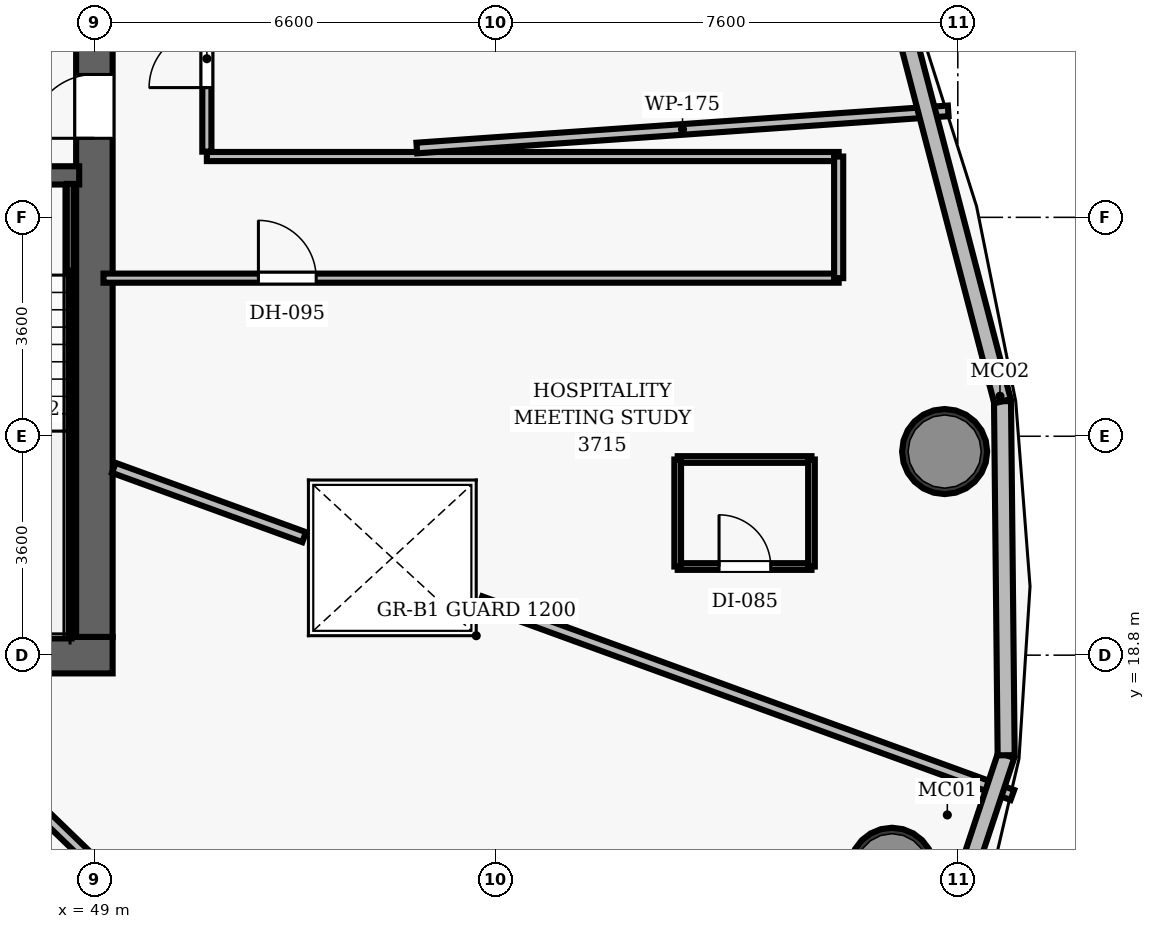
"""IFC4 building model, lengths in metres.
Left out: names, types, materials, properties, quantities, classifications, styles, units other than length and angle.
Written with IfcOpenShell. Run it as: python <this file> out.ifc"""

import sys

from ifc_helpers import new_model, si_unit, direction, frame, frame_2d, origin, origin_2d, place, context, subcontext, project, spatial, rectangle, hollow_circle, extrude, element, fill, save


model = new_model("IFC4")
c1 = context("Model", 3, precision=1e-05, world=origin(), true_north=direction((0.0, 1.0)))
c2 = subcontext(c1, "Body", "Model", "MODEL_VIEW")
j1 = project(units=[si_unit("LENGTHUNIT", "METRE"), si_unit("PLANEANGLEUNIT", "RADIAN")], contexts=[c1])
p1 = place(None, origin())
s1 = spatial("IfcSite", under=j1, at=p1, CompositionType="ELEMENT")
p2 = place(p1, origin())
s2 = spatial("IfcBuilding", under=s1, at=p2, CompositionType="ELEMENT")
p3 = place(p2, frame((0.0, 0.0, 148.3)))
s3 = spatial("IfcBuildingStorey", under=s2, at=p3, CompositionType="ELEMENT", Elevation=148.3)
p4 = place(p3, frame((26.7, 18.8, 0.0), z_axis=(0.0, 0.0, 1.0), x_axis=(1.0, 0.0, 0.0)))
e1 = element("IfcWall", 1, at=p4, inside=s3, PredefinedType="SHEAR", context=c2, shape_type="SweptSolid", body=[
    extrude(rectangle(XDim=22.6, YDim=0.6, at=frame_2d((11.3, 0.0))), origin(), (0.0, 0.0, 1.0), 3.5),
])
p5 = place(p4, frame((14.52, 0.0, 0.0)))
e2 = element("IfcOpeningElement", 2, at=p5, cuts=e1, PredefinedType="OPENING", context=c2, shape_type="SweptSolid", body=[
    extrude(rectangle(XDim=1.05, YDim=2.15, at=frame_2d((0.525, 1.075))), frame((0.0, 0.31, 0.0), z_axis=(0.0, -1.0, 0.0), x_axis=(1.0, 0.0, 0.0)), (0.0, 0.0, 1.0), 0.62),
])
p6 = place(p3, frame((49.0, 19.1, 0.0), z_axis=(0.0, 0.0, 1.0), x_axis=(0.0, 1.0, 0.0)))
e3 = element("IfcWall", 3, at=p6, inside=s3, PredefinedType="SHEAR", context=c2, shape_type="SweptSolid", body=[
    extrude(rectangle(XDim=13.8, YDim=0.6, at=frame_2d((6.9, 0.0))), origin(), (0.0, 0.0, 1.0), 3.5),
])
p7 = place(p6, frame((8.2, 0.0, 0.0)))
e4 = element("IfcOpeningElement", 4, at=p7, cuts=e3, PredefinedType="OPENING", context=c2, shape_type="SweptSolid", body=[
    extrude(rectangle(XDim=1.05, YDim=2.15, at=frame_2d((0.525, 1.075))), frame((0.0, 0.31, 0.0), z_axis=(0.0, -1.0, 0.0), x_axis=(1.0, 0.0, 0.0)), (0.0, 0.0, 1.0), 0.62),
])
for number, where, z_axis, x_axis in (
    (5, (62.118, 15.262, 0.0), (0.0, 0.0, 1.0), (1.0, 0.0, 0.0)),
    (6, (62.984, 22.148, 0.0), (0.0, 0.0, 1.0), (1.0, 0.0, 0.0)),
):
    element("IfcColumn", number, at=place(p3, frame(where, z_axis=z_axis, x_axis=x_axis)), inside=s3, PredefinedType="COLUMN", context=c2, shape_type="SweptSolid", body=[
        extrude(hollow_circle(Radius=0.7, WallThickness=0.055, at=origin_2d()), origin(), (0.0, 0.0, 1.0), 3.5),
    ])
p8 = place(p3, frame((45.08, 26.69, 0.0), z_axis=(0.0, 0.0, 1.0), x_axis=(1.0, 0.0, 0.0)))
e7 = element("IfcWall", 7, at=p8, inside=s3, PredefinedType="SHEAR", context=c2, shape_type="SweptSolid", body=[
    extrude(rectangle(XDim=3.67, YDim=0.3, at=frame_2d((1.835, 0.0))), origin(), (0.0, 0.0, 1.0), 3.5),
])
p9 = place(p8, frame((1.05, 0.0, 0.0)))
e8 = element("IfcOpeningElement", 8, at=p9, cuts=e7, PredefinedType="OPENING", context=c2, shape_type="SweptSolid", body=[
    extrude(rectangle(XDim=1.1, YDim=2.15, at=frame_2d((0.55, 1.075))), frame((0.0, 0.16, 0.0), z_axis=(0.0, -1.0, 0.0), x_axis=(1.0, 0.0, 0.0)), (0.0, 0.0, 1.0), 0.32),
])
p10 = place(p3, frame((48.605, 19.1, 0.0), z_axis=(0.0, 0.0, 1.0), x_axis=(0.0, 1.0, 0.0)))
e9 = element("IfcWall", 9, at=p10, inside=s3, PredefinedType="SHEAR", context=c2, shape_type="SweptSolid", body=[
    extrude(rectangle(XDim=7.45, YDim=0.12, at=frame_2d((3.725, 0.0))), origin(), (0.0, 0.0, 1.0), 3.5),
])
p11 = place(p3, frame((45.51, 19.16, 0.0), z_axis=(0.0, 0.0, 1.0), x_axis=(1.0, 0.0, 0.0)))
e10 = element("IfcWall", 10, at=p11, inside=s3, PredefinedType="SHEAR", context=c2, shape_type="SweptSolid", body=[
    extrude(rectangle(XDim=3.095, YDim=0.12, at=frame_2d((1.547, 0.0))), origin(), (0.0, 0.0, 1.0), 3.5),
])
p12 = place(p3, frame((50.85, 27.08, 0.0), z_axis=(0.0, 0.0, 1.0), x_axis=(0.0, 1.0, 0.0)))
e11 = element("IfcWall", 11, at=p12, inside=s3, PredefinedType="PARTITIONING", context=c2, shape_type="SweptSolid", body=[
    extrude(rectangle(XDim=8.12, YDim=0.15, at=frame_2d((4.06, 0.0))), origin(), (0.0, 0.0, 1.0), 2.675),
])
p13 = place(p12, frame((1.054, 0.0, 0.0)))
e12 = element("IfcOpeningElement", 12, at=p13, cuts=e11, PredefinedType="OPENING", context=c2, shape_type="SweptSolid", body=[
    extrude(rectangle(XDim=0.95, YDim=2.15, at=frame_2d((0.475, 1.075))), frame((0.0, 0.085, 0.0), z_axis=(0.0, -1.0, 0.0), x_axis=(1.0, 0.0, 0.0)), (0.0, 0.0, 1.0), 0.17),
])
p14 = place(p3, frame((50.85, 27.0, 0.0), z_axis=(0.0, 0.0, 1.0), x_axis=(1.0, 0.0, 0.0)))
e13 = element("IfcWall", 13, at=p14, inside=s3, PredefinedType="PARTITIONING", context=c2, shape_type="SweptSolid", body=[
    extrude(rectangle(XDim=10.391, YDim=0.15, at=frame_2d((5.195, 0.0))), origin(), (0.0, 0.0, 1.0), 2.675),
])
p15 = place(p3, frame((49.15, 25.0, 0.0), z_axis=(0.0, 0.0, 1.0), x_axis=(1.0, 0.0, 0.0)))
e14 = element("IfcWall", 14, at=p15, inside=s3, PredefinedType="PARTITIONING", context=c2, shape_type="SweptSolid", body=[
    extrude(rectangle(XDim=12.091, YDim=0.15, at=frame_2d((6.045, 0.0))), origin(), (0.0, 0.0, 1.0), 2.675),
])
p16 = place(p15, frame((2.548, 0.0, 0.0)))
e15 = element("IfcOpeningElement", 15, at=p16, cuts=e14, PredefinedType="OPENING", context=c2, shape_type="SweptSolid", body=[
    extrude(rectangle(XDim=0.95, YDim=2.15, at=frame_2d((0.475, 1.075))), frame((0.0, 0.085, 0.0), z_axis=(0.0, -1.0, 0.0), x_axis=(1.0, 0.0, 0.0)), (0.0, 0.0, 1.0), 0.17),
])
p17 = place(p3, frame((61.241, 25.0, 0.0), z_axis=(0.0, 0.0, 1.0), x_axis=(0.0, 1.0, 0.0)))
e16 = element("IfcWall", 16, at=p17, inside=s3, PredefinedType="PARTITIONING", context=c2, shape_type="SweptSolid", body=[
    extrude(rectangle(XDim=2.0, YDim=0.15, at=frame_2d((1.0, 0.0))), origin(), (0.0, 0.0, 1.0), 2.675),
])
p18 = place(p3, frame((54.303, 27.14, 0.0), z_axis=(0.0, 0.0, 1.0), x_axis=(0.997562576326, 0.069777548777, 0.0)))
e17 = element("IfcWall", 17, at=p18, inside=s3, PredefinedType="PARTITIONING", context=c2, shape_type="SweptSolid", body=[
    extrude(rectangle(XDim=8.761, YDim=0.175, at=frame_2d((4.38, 0.0))), origin(), (0.0, 0.0, 1.0), 2.675),
])
p19 = place(p3, frame((45.787, 18.48, 0.0), z_axis=(0.0, 0.0, 1.0), x_axis=(0.719347752113, -0.694650136062, 0.0)))
e18 = element("IfcWall", 18, at=p19, inside=s3, PredefinedType="PARTITIONING", context=c2, shape_type="SweptSolid", body=[
    extrude(rectangle(XDim=16.449, YDim=0.175, at=frame_2d((8.225, 0.0))), origin(), (0.0, 0.0, 1.0), 2.675),
])
p20 = place(p3, frame((49.32, 21.88, 0.0), z_axis=(0.0, 0.0, 1.0), x_axis=(0.939671379792, -0.34207849684, 0.0)))
e19 = element("IfcWall", 19, at=p20, inside=s3, PredefinedType="PARTITIONING", context=c2, shape_type="SweptSolid", body=[
    extrude(rectangle(XDim=3.331, YDim=0.175, at=frame_2d((1.666, 0.0))), origin(), (0.0, 0.0, 1.0), 2.675),
])
p21 = place(p3, frame((55.35, 19.685, 0.0), z_axis=(0.0, 0.0, 1.0), x_axis=(0.939690778586, -0.342025204686, 0.0)))
e20 = element("IfcWall", 20, at=p21, inside=s3, PredefinedType="PARTITIONING", context=c2, shape_type="SweptSolid", body=[
    extrude(rectangle(XDim=9.31, YDim=0.175, at=frame_2d((4.655, 0.0))), origin(), (0.0, 0.0, 1.0), 2.675),
])
p22 = place(p3, frame((58.594, 20.258, 0.0), z_axis=(0.0, 0.0, 1.0), x_axis=(1.0, 0.0, 0.0)))
e21 = element("IfcWall", 21, at=p22, inside=s3, PredefinedType="PARTITIONING", context=c2, shape_type="SweptSolid", body=[
    extrude(rectangle(XDim=2.2, YDim=0.11, at=frame_2d((1.1, 0.0))), origin(), (0.0, 0.0, 1.0), 2.675),
])
p23 = place(p22, frame((0.68, 0.0, 0.0)))
e22 = element("IfcOpeningElement", 22, at=p23, cuts=e21, PredefinedType="OPENING", context=c2, shape_type="SweptSolid", body=[
    extrude(rectangle(XDim=0.85, YDim=2.1, at=frame_2d((0.425, 1.05))), frame((0.0, 0.065, 0.0), z_axis=(0.0, -1.0, 0.0), x_axis=(1.0, 0.0, 0.0)), (0.0, 0.0, 1.0), 0.13),
])
p24 = place(p3, frame((58.594, 22.018, 0.0), z_axis=(0.0, 0.0, 1.0), x_axis=(1.0, 0.0, 0.0)))
e23 = element("IfcWall", 23, at=p24, inside=s3, PredefinedType="PARTITIONING", context=c2, shape_type="SweptSolid", body=[
    extrude(rectangle(XDim=2.2, YDim=0.11, at=frame_2d((1.1, 0.0))), origin(), (0.0, 0.0, 1.0), 2.675),
])
for number, where, z_axis, x_axis in (
    (24, (58.594, 20.258, 0.0), (0.0, 0.0, 1.0), (0.0, 1.0, 0.0)),
    (25, (60.793, 20.258, 0.0), (0.0, 0.0, 1.0), (0.0, 1.0, 0.0)),
):
    element("IfcWall", number, at=place(p3, frame(where, z_axis=z_axis, x_axis=x_axis)), inside=s3, PredefinedType="PARTITIONING", context=c2, shape_type="SweptSolid", body=[
        extrude(rectangle(XDim=1.76, YDim=0.11, at=frame_2d((0.88, 0.0))), origin(), (0.0, 0.0, 1.0), 2.675),
    ])
p25 = place(p3, frame((63.995, 17.154, 0.0), z_axis=(0.0, 0.0, 1.0), x_axis=(-0.315180118381, -0.949031871423, 0.0)))
e26 = element("IfcWall", 26, at=p25, inside=s3, PredefinedType="SOLIDWALL", context=c2, shape_type="SweptSolid", body=[
    extrude(rectangle(XDim=5.174, YDim=0.28, at=frame_2d((2.587, 0.0))), origin(), (0.0, 0.0, 1.0), 3.26),
])
p26 = place(p3, frame((63.935, 22.976, 0.0), z_axis=(0.0, 0.0, 1.0), x_axis=(0.010314349205, -0.999946805685, 0.0)))
e27 = element("IfcWall", 27, at=p26, inside=s3, PredefinedType="SOLIDWALL", context=c2, shape_type="SweptSolid", body=[
    extrude(rectangle(XDim=5.823, YDim=0.28, at=frame_2d((2.911, 0.0))), origin(), (0.0, 0.0, 1.0), 3.26),
])
p27 = place(p3, frame((62.251, 29.425, 0.0), z_axis=(0.0, 0.0, 1.0), x_axis=(0.252709673809, -0.967542154515, 0.0)))
e28 = element("IfcWall", 28, at=p27, inside=s3, PredefinedType="SOLIDWALL", context=c2, shape_type="SweptSolid", body=[
    extrude(rectangle(XDim=6.665, YDim=0.28, at=frame_2d((3.333, 0.0))), origin(), (0.0, 0.0, 1.0), 3.26),
])
p28 = place(p7, origin())
e29 = element("IfcDoor", 29, at=p28, inside=s3, OperationType="SINGLE_SWING_LEFT", PredefinedType="DOOR", context=c2, shape_type="SweptSolid", body=[
    extrude(rectangle(XDim=1.05, YDim=2.15, at=frame_2d((0.525, 1.075))), frame((0.0, 0.025, 0.0), z_axis=(0.0, -1.0, 0.0), x_axis=(1.0, 0.0, 0.0)), (0.0, 0.0, 1.0), 0.05),
])
fill(e4, e29)
p29 = place(p13, origin())
e30 = element("IfcDoor", 30, at=p29, inside=s3, OperationType="SINGLE_SWING_LEFT", PredefinedType="DOOR", context=c2, shape_type="SweptSolid", body=[
    extrude(rectangle(XDim=0.95, YDim=2.15, at=frame_2d((0.475, 1.075))), frame((0.0, 0.025, 0.0), z_axis=(0.0, -1.0, 0.0), x_axis=(1.0, 0.0, 0.0)), (0.0, 0.0, 1.0), 0.05),
])
fill(e12, e30)
p30 = place(p16, origin())
e31 = element("IfcDoor", 31, at=p30, inside=s3, OperationType="SINGLE_SWING_LEFT", PredefinedType="DOOR", context=c2, shape_type="SweptSolid", body=[
    extrude(rectangle(XDim=0.95, YDim=2.15, at=frame_2d((0.475, 1.075))), frame((0.0, 0.025, 0.0), z_axis=(0.0, -1.0, 0.0), x_axis=(1.0, 0.0, 0.0)), (0.0, 0.0, 1.0), 0.05),
])
fill(e15, e31)
p31 = place(p23, origin())
e32 = element("IfcDoor", 32, at=p31, inside=s3, OperationType="SINGLE_SWING_LEFT", PredefinedType="DOOR", context=c2, shape_type="SweptSolid", body=[
    extrude(rectangle(XDim=0.85, YDim=2.1, at=frame_2d((0.425, 1.05))), frame((0.0, 0.025, 0.0), z_axis=(0.0, -1.0, 0.0), x_axis=(1.0, 0.0, 0.0)), (0.0, 0.0, 1.0), 0.05),
])
fill(e22, e32)
save(model, sys.argv[1])
